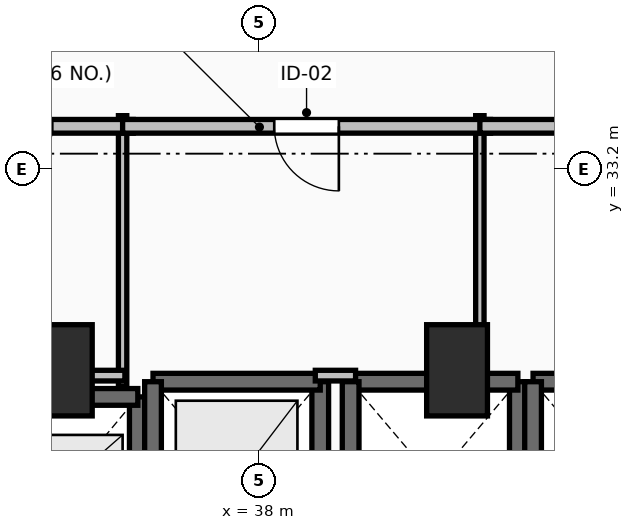
"""IFC4 building model, lengths in metres.
Left out: names, types, materials, properties, quantities, classifications, styles, units other than length and angle.
Written with IfcOpenShell. Run it as: python <this file> out.ifc"""

import sys

from ifc_helpers import new_model, si_unit, direction, frame, frame_2d, origin, origin_2d, place, context, subcontext, project, spatial, rectangle, extrude, element, fill, save


model = new_model("IFC4")
c1 = context("Model", 3, precision=1e-05, world=origin(), true_north=direction((0.0, 1.0)))
c2 = subcontext(c1, "Body", "Model", "MODEL_VIEW")
j1 = project(units=[si_unit("LENGTHUNIT", "METRE"), si_unit("PLANEANGLEUNIT", "RADIAN")], contexts=[c1])
p1 = place(None, origin())
s1 = spatial("IfcSite", under=j1, at=p1, CompositionType="ELEMENT")
p2 = place(p1, origin())
s2 = spatial("IfcBuilding", under=s1, at=p2, CompositionType="ELEMENT")
p3 = place(p2, frame((0.0, 0.0, 89.3)))
s3 = spatial("IfcBuildingStorey", under=s2, at=p3, CompositionType="ELEMENT", Elevation=89.3)
for number, where, z_axis, x_axis in (
    (1, (35.4, 30.55, 0.0), (0.0, 0.0, 1.0), (1.0, 0.0, 0.0)),
    (2, (40.6, 30.55, 0.0), (0.0, 0.0, 1.0), (1.0, 0.0, 0.0)),
):
    element("IfcColumn", number, at=place(p3, frame(where, z_axis=z_axis, x_axis=x_axis)), inside=s3, PredefinedType="PILASTER", context=c2, shape_type="SweptSolid", body=[
        extrude(rectangle(XDim=0.8, YDim=1.2, at=origin_2d()), origin(), (0.0, 0.0, 1.0), 3.5),
    ])
p4 = place(p3, frame((36.4, 27.8, 0.0), z_axis=(0.0, 0.0, 1.0), x_axis=(0.0, 1.0, 0.0)))
e3 = element("IfcWall", 3, at=p4, inside=s3, PredefinedType="SOLIDWALL", context=c2, shape_type="SweptSolid", body=[
    extrude(rectangle(XDim=2.4, YDim=0.22, at=frame_2d((1.2, 0.0))), origin(), (0.0, 0.0, 1.0), 3.24),
])
p5 = place(p3, frame((36.4, 30.2, 0.0), z_axis=(0.0, 0.0, 1.0), x_axis=(-1.0, 0.0, 0.0)))
e4 = element("IfcWall", 4, at=p5, inside=s3, PredefinedType="SOLIDWALL", context=c2, shape_type="SweptSolid", body=[
    extrude(rectangle(XDim=2.0, YDim=0.22, at=frame_2d((1.0, 0.0))), origin(), (0.0, 0.0, 1.0), 3.24),
])
p6 = place(p3, frame((38.8, 27.8, 0.0), z_axis=(0.0, 0.0, 1.0), x_axis=(0.0, 1.0, 0.0)))
e5 = element("IfcWall", 5, at=p6, inside=s3, PredefinedType="SOLIDWALL", context=c2, shape_type="SweptSolid", body=[
    extrude(rectangle(XDim=2.6, YDim=0.22, at=frame_2d((1.3, 0.0))), origin(), (0.0, 0.0, 1.0), 3.24),
])
p7 = place(p3, frame((38.8, 30.4, 0.0), z_axis=(0.0, 0.0, 1.0), x_axis=(-1.0, 0.0, 0.0)))
e6 = element("IfcWall", 6, at=p7, inside=s3, PredefinedType="SOLIDWALL", context=c2, shape_type="SweptSolid", body=[
    extrude(rectangle(XDim=2.2, YDim=0.22, at=frame_2d((1.1, 0.0))), origin(), (0.0, 0.0, 1.0), 3.24),
])
for number, where, z_axis, x_axis in (
    (7, (36.6, 30.4, 0.0), (0.0, 0.0, 1.0), (0.0, -1.0, 0.0)),
    (8, (41.4, 27.8, 0.0), (0.0, 0.0, 1.0), (0.0, 1.0, 0.0)),
):
    element("IfcWall", number, at=place(p3, frame(where, z_axis=z_axis, x_axis=x_axis)), inside=s3, PredefinedType="SOLIDWALL", context=c2, shape_type="SweptSolid", body=[
        extrude(rectangle(XDim=2.6, YDim=0.22, at=frame_2d((1.3, 0.0))), origin(), (0.0, 0.0, 1.0), 3.24),
    ])
p8 = place(p3, frame((41.4, 30.4, 0.0), z_axis=(0.0, 0.0, 1.0), x_axis=(-1.0, 0.0, 0.0)))
e9 = element("IfcWall", 9, at=p8, inside=s3, PredefinedType="SOLIDWALL", context=c2, shape_type="SweptSolid", body=[
    extrude(rectangle(XDim=2.2, YDim=0.22, at=frame_2d((1.1, 0.0))), origin(), (0.0, 0.0, 1.0), 3.24),
])
p9 = place(p3, frame((39.2, 30.4, 0.0), z_axis=(0.0, 0.0, 1.0), x_axis=(0.0, -1.0, 0.0)))
e10 = element("IfcWall", 10, at=p9, inside=s3, PredefinedType="SOLIDWALL", context=c2, shape_type="SweptSolid", body=[
    extrude(rectangle(XDim=2.6, YDim=0.22, at=frame_2d((1.3, 0.0))), origin(), (0.0, 0.0, 1.0), 3.24),
])
p10 = place(p3, frame((43.8, 30.4, 0.0), z_axis=(0.0, 0.0, 1.0), x_axis=(-1.0, 0.0, 0.0)))
e11 = element("IfcWall", 11, at=p10, inside=s3, PredefinedType="SOLIDWALL", context=c2, shape_type="SweptSolid", body=[
    extrude(rectangle(XDim=2.2, YDim=0.22, at=frame_2d((1.1, 0.0))), origin(), (0.0, 0.0, 1.0), 3.24),
])
p11 = place(p3, frame((41.6, 30.4, 0.0), z_axis=(0.0, 0.0, 1.0), x_axis=(0.0, -1.0, 0.0)))
e12 = element("IfcWall", 12, at=p11, inside=s3, PredefinedType="SOLIDWALL", context=c2, shape_type="SweptSolid", body=[
    extrude(rectangle(XDim=2.6, YDim=0.22, at=frame_2d((1.3, 0.0))), origin(), (0.0, 0.0, 1.0), 3.24),
])
p12 = place(p3, frame((36.2, 30.34, 0.0), z_axis=(0.0, 0.0, 1.0), x_axis=(0.0, 1.0, 0.0)))
e13 = element("IfcWall", 13, at=p12, inside=s3, PredefinedType="PARTITIONING", context=c2, shape_type="SweptSolid", body=[
    extrude(rectangle(XDim=3.56, YDim=0.11, at=frame_2d((1.78, 0.0))), origin(), (0.0, 0.0, 1.0), 2.432),
])
p13 = place(p3, frame((36.34, 33.76, 0.0), z_axis=(0.0, 0.0, 1.0), x_axis=(-1.0, 0.0, 0.0)))
e14 = element("IfcWall", 14, at=p13, inside=s3, PredefinedType="PARTITIONING", context=c2, shape_type="SweptSolid", body=[
    extrude(rectangle(XDim=2.98, YDim=0.18, at=frame_2d((1.49, 0.0))), origin(), (0.0, 0.0, 1.0), 3.24),
])
p14 = place(p13, frame((1.065, 0.0, 0.0)))
e15 = element("IfcOpeningElement", 15, at=p14, cuts=e14, PredefinedType="OPENING", context=c2, shape_type="SweptSolid", body=[
    extrude(rectangle(XDim=0.85, YDim=2.1, at=frame_2d((0.425, 1.05))), frame((0.0, 0.105, 0.0), z_axis=(0.0, -1.0, 0.0), x_axis=(1.0, 0.0, 0.0)), (0.0, 0.0, 1.0), 0.21),
])
p15 = place(p3, frame((40.9, 30.34, 0.0), z_axis=(0.0, 0.0, 1.0), x_axis=(0.0, 1.0, 0.0)))
e16 = element("IfcWall", 16, at=p15, inside=s3, PredefinedType="PARTITIONING", context=c2, shape_type="SweptSolid", body=[
    extrude(rectangle(XDim=3.56, YDim=0.11, at=frame_2d((1.78, 0.0))), origin(), (0.0, 0.0, 1.0), 3.24),
])
p16 = place(p3, frame((41.04, 33.76, 0.0), z_axis=(0.0, 0.0, 1.0), x_axis=(-1.0, 0.0, 0.0)))
e17 = element("IfcWall", 17, at=p16, inside=s3, PredefinedType="PARTITIONING", context=c2, shape_type="SweptSolid", body=[
    extrude(rectangle(XDim=4.84, YDim=0.18, at=frame_2d((2.42, 0.0))), origin(), (0.0, 0.0, 1.0), 3.24),
])
p17 = place(p16, frame((1.995, 0.0, 0.0)))
e18 = element("IfcOpeningElement", 18, at=p17, cuts=e17, PredefinedType="OPENING", context=c2, shape_type="SweptSolid", body=[
    extrude(rectangle(XDim=0.85, YDim=2.1, at=frame_2d((0.425, 1.05))), frame((0.0, 0.105, 0.0), z_axis=(0.0, -1.0, 0.0), x_axis=(1.0, 0.0, 0.0)), (0.0, 0.0, 1.0), 0.21),
])
p18 = place(p3, frame((44.26, 33.76, 0.0), z_axis=(0.0, 0.0, 1.0), x_axis=(-1.0, 0.0, 0.0)))
e19 = element("IfcWall", 19, at=p18, inside=s3, PredefinedType="PARTITIONING", context=c2, shape_type="SweptSolid", body=[
    extrude(rectangle(XDim=3.36, YDim=0.18, at=frame_2d((1.68, 0.0))), origin(), (0.0, 0.0, 1.0), 3.24),
])
p19 = place(p18, frame((1.255, 0.0, 0.0)))
e20 = element("IfcOpeningElement", 20, at=p19, cuts=e19, PredefinedType="OPENING", context=c2, shape_type="SweptSolid", body=[
    extrude(rectangle(XDim=0.85, YDim=2.1, at=frame_2d((0.425, 1.05))), frame((0.0, 0.105, 0.0), z_axis=(0.0, -1.0, 0.0), x_axis=(1.0, 0.0, 0.0)), (0.0, 0.0, 1.0), 0.21),
])
p20 = place(p3, frame((33.44, 30.48, 0.0), z_axis=(0.0, 0.0, 1.0), x_axis=(1.0, 0.0, 0.0)))
e21 = element("IfcWall", 21, at=p20, inside=s3, PredefinedType="PARTITIONING", context=c2, shape_type="SweptSolid", body=[
    extrude(rectangle(XDim=2.79, YDim=0.14, at=frame_2d((1.395, 0.0))), origin(), (0.0, 0.0, 1.0), 2.432),
])
p21 = place(p3, frame((38.735, 30.48, 0.0), z_axis=(0.0, 0.0, 1.0), x_axis=(1.0, 0.0, 0.0)))
e22 = element("IfcWall", 22, at=p21, inside=s3, PredefinedType="PARTITIONING", context=c2, shape_type="SweptSolid", body=[
    extrude(rectangle(XDim=0.53, YDim=0.14, at=frame_2d((0.265, 0.0))), origin(), (0.0, 0.0, 1.0), 2.432),
])
p22 = place(p14, origin())
e23 = element("IfcDoor", 23, at=p22, inside=s3, OperationType="SINGLE_SWING_RIGHT", PredefinedType="DOOR", context=c2, shape_type="SweptSolid", body=[
    extrude(rectangle(XDim=0.85, YDim=2.1, at=frame_2d((0.425, 1.05))), frame((0.0, 0.025, 0.0), z_axis=(0.0, -1.0, 0.0), x_axis=(1.0, 0.0, 0.0)), (0.0, 0.0, 1.0), 0.05),
])
fill(e15, e23)
p23 = place(p17, origin())
e24 = element("IfcDoor", 24, at=p23, inside=s3, OperationType="SINGLE_SWING_LEFT", PredefinedType="DOOR", context=c2, shape_type="SweptSolid", body=[
    extrude(rectangle(XDim=0.85, YDim=2.1, at=frame_2d((0.425, 1.05))), frame((0.0, 0.025, 0.0), z_axis=(0.0, -1.0, 0.0), x_axis=(1.0, 0.0, 0.0)), (0.0, 0.0, 1.0), 0.05),
])
fill(e18, e24)
save(model, sys.argv[1])
